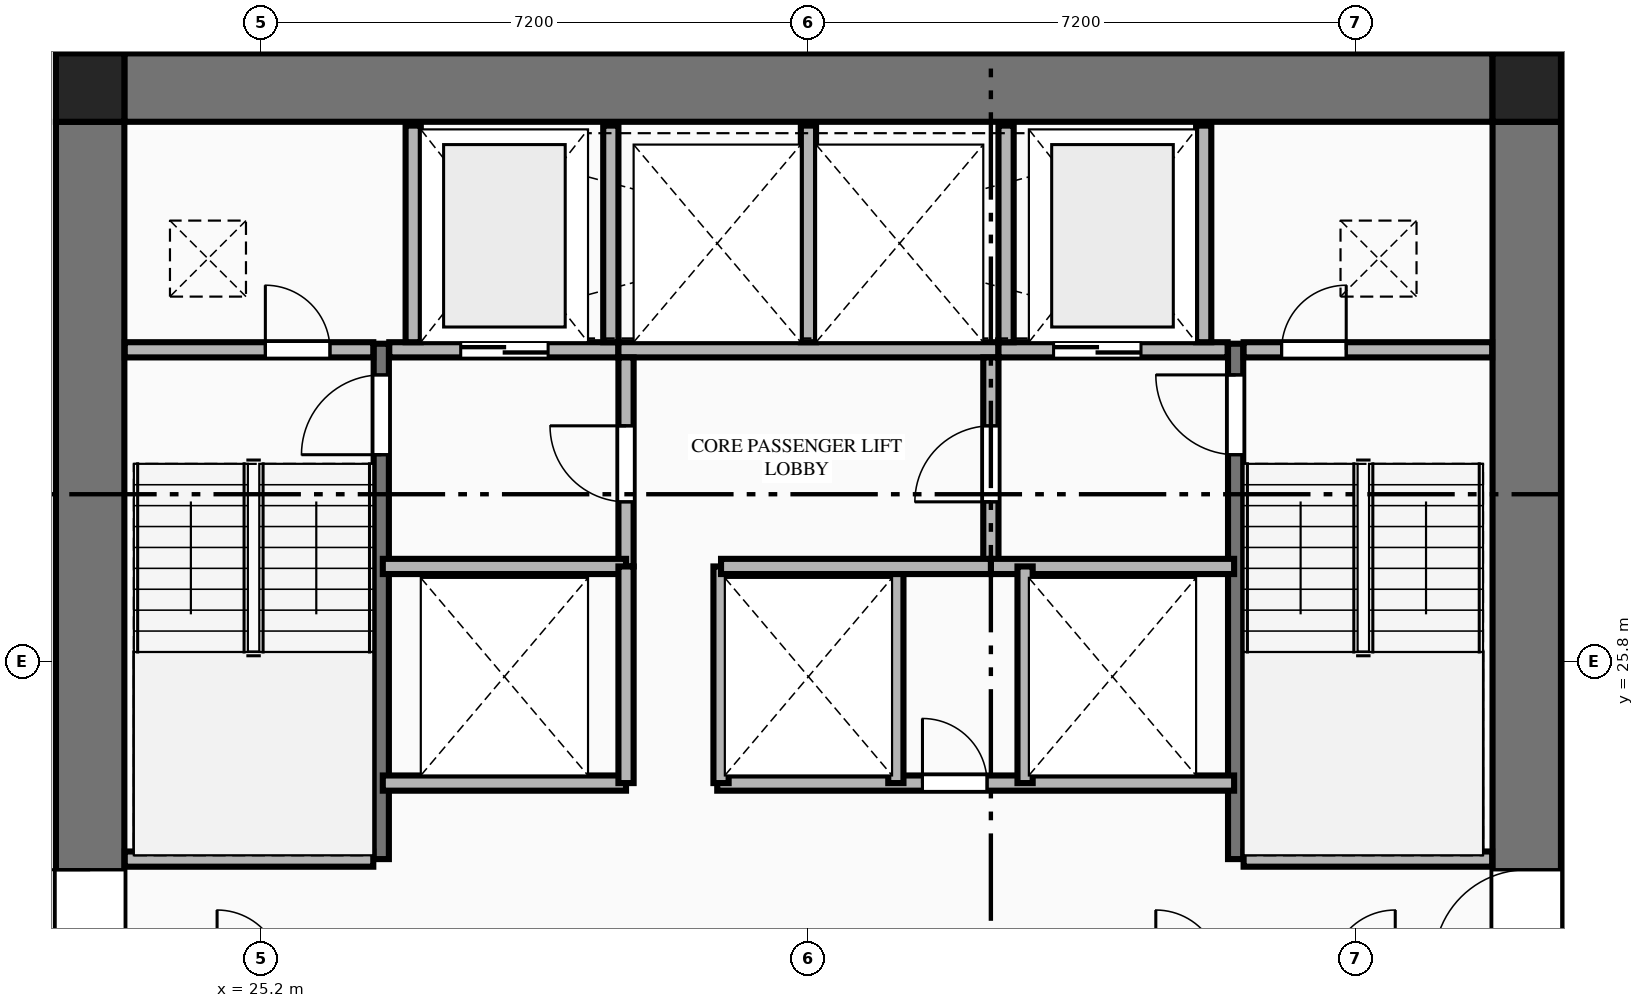
"""IFC4 building model, lengths in metres.
Left out: names, types, materials, properties, quantities, classifications, styles, units other than length and angle.
Written with IfcOpenShell. Run it as: python <this file> out.ifc"""

import sys

from ifc_helpers import new_model, si_unit, direction, frame, frame_2d, origin, origin_2d, place, context, subcontext, project, spatial, rectangle, extrude, element, fill, save


model = new_model("IFC4")
c1 = context("Model", 3, precision=1e-05, world=origin(), true_north=direction((0.0, 1.0)))
c2 = subcontext(c1, "Body", "Model", "MODEL_VIEW")
j1 = project(units=[si_unit("LENGTHUNIT", "METRE"), si_unit("PLANEANGLEUNIT", "RADIAN")], contexts=[c1])
p1 = place(None, origin())
s1 = spatial("IfcSite", under=j1, at=p1, CompositionType="ELEMENT")
p2 = place(p1, origin())
s2 = spatial("IfcBuilding", under=s1, at=p2, CompositionType="ELEMENT")
p3 = place(p2, frame((0.0, 0.0, 71.05)))
s3 = spatial("IfcBuildingStorey", under=s2, at=p3, CompositionType="ELEMENT", Elevation=71.05)
for number, where, z_axis, x_axis in (
    (1, (41.85, 33.35, 0.0), (0.0, 0.0, 1.0), (1.0, 0.0, 0.0)),
    (2, (22.95, 33.35, 0.0), (0.0, 0.0, 1.0), (1.0, 0.0, 0.0)),
):
    element("IfcColumn", number, at=place(p3, frame(where, z_axis=z_axis, x_axis=x_axis)), inside=s3, PredefinedType="COLUMN", context=c2, shape_type="SweptSolid", body=[
        extrude(rectangle(XDim=0.9, YDim=0.9, at=origin_2d()), origin(), (0.0, 0.0, 1.0), 3.55),
    ])
p4 = place(p3, frame((23.4, 33.35, 0.0), z_axis=(0.0, 0.0, 1.0), x_axis=(1.0, 0.0, 0.0)))
e3 = element("IfcWall", 3, at=p4, inside=s3, PredefinedType="SHEAR", context=c2, shape_type="SweptSolid", body=[
    extrude(rectangle(XDim=18.0, YDim=0.9, at=frame_2d((9.0, 0.0))), origin(), (0.0, 0.0, 1.0), 3.27),
])
p5 = place(p3, frame((22.95, 18.9, 0.0), z_axis=(0.0, 0.0, 1.0), x_axis=(0.0, 1.0, 0.0)))
e4 = element("IfcWall", 4, at=p5, inside=s3, PredefinedType="SHEAR", context=c2, shape_type="SweptSolid", body=[
    extrude(rectangle(XDim=14.0, YDim=0.9, at=frame_2d((7.0, 0.0))), origin(), (0.0, 0.0, 1.0), 3.27),
])
p6 = place(p5, frame((2.94, 0.0, 0.0)))
e5 = element("IfcOpeningElement", 5, at=p6, cuts=e4, PredefinedType="OPENING", context=c2, shape_type="SweptSolid", body=[
    extrude(rectangle(XDim=1.22, YDim=2.25, at=frame_2d((0.61, 1.125))), frame((0.0, 0.46, 0.0), z_axis=(0.0, -1.0, 0.0), x_axis=(1.0, 0.0, 0.0)), (0.0, 0.0, 1.0), 0.92),
])
p7 = place(p3, frame((41.85, 18.9, 0.0), z_axis=(0.0, 0.0, 1.0), x_axis=(0.0, 1.0, 0.0)))
e6 = element("IfcWall", 6, at=p7, inside=s3, PredefinedType="SHEAR", context=c2, shape_type="SweptSolid", body=[
    extrude(rectangle(XDim=14.0, YDim=0.9, at=frame_2d((7.0, 0.0))), origin(), (0.0, 0.0, 1.0), 3.27),
])
p8 = place(p7, frame((2.94, 0.0, 0.0)))
e7 = element("IfcOpeningElement", 7, at=p8, cuts=e6, PredefinedType="OPENING", context=c2, shape_type="SweptSolid", body=[
    extrude(rectangle(XDim=1.22, YDim=2.25, at=frame_2d((0.61, 1.125))), frame((0.0, 0.46, 0.0), z_axis=(0.0, -1.0, 0.0), x_axis=(1.0, 0.0, 0.0)), (0.0, 0.0, 1.0), 0.92),
])
p9 = place(p3, frame((26.78, 23.2, 0.0), z_axis=(0.0, 0.0, 1.0), x_axis=(0.0, 1.0, 0.0)))
e8 = element("IfcWall", 8, at=p9, inside=s3, PredefinedType="SHEAR", context=c2, shape_type="SweptSolid", body=[
    extrude(rectangle(XDim=6.78, YDim=0.2, at=frame_2d((3.39, 0.0))), origin(), (0.0, 0.0, 1.0), 3.55),
])
p10 = place(p9, frame((5.32, 0.0, 0.0)))
e9 = element("IfcOpeningElement", 9, at=p10, cuts=e8, PredefinedType="OPENING", context=c2, shape_type="SweptSolid", body=[
    extrude(rectangle(XDim=1.05, YDim=2.15, at=frame_2d((0.525, 1.075))), frame((0.0, 0.11, 0.0), z_axis=(0.0, -1.0, 0.0), x_axis=(1.0, 0.0, 0.0)), (0.0, 0.0, 1.0), 0.22),
])
p11 = place(p3, frame((23.405, 23.2, 0.0), z_axis=(0.0, 0.0, 1.0), x_axis=(1.0, 0.0, 0.0)))
e10 = element("IfcWall", 10, at=p11, inside=s3, PredefinedType="PLUMBINGWALL", context=c2, shape_type="SweptSolid", body=[
    extrude(rectangle(XDim=3.27, YDim=0.2, at=frame_2d((1.635, 0.0))), origin(), (0.0, 0.0, 1.0), 3.27),
])
p12 = place(p3, frame((38.02, 23.2, 0.0), z_axis=(0.0, 0.0, 1.0), x_axis=(0.0, 1.0, 0.0)))
e11 = element("IfcWall", 11, at=p12, inside=s3, PredefinedType="SHEAR", context=c2, shape_type="SweptSolid", body=[
    extrude(rectangle(XDim=6.78, YDim=0.2, at=frame_2d((3.39, 0.0))), origin(), (0.0, 0.0, 1.0), 3.55),
])
p13 = place(p12, frame((5.32, 0.0, 0.0)))
e12 = element("IfcOpeningElement", 12, at=p13, cuts=e11, PredefinedType="OPENING", context=c2, shape_type="SweptSolid", body=[
    extrude(rectangle(XDim=1.05, YDim=2.15, at=frame_2d((0.525, 1.075))), frame((0.0, 0.11, 0.0), z_axis=(0.0, -1.0, 0.0), x_axis=(1.0, 0.0, 0.0)), (0.0, 0.0, 1.0), 0.22),
])
p14 = place(p3, frame((38.125, 23.2, 0.0), z_axis=(0.0, 0.0, 1.0), x_axis=(1.0, 0.0, 0.0)))
e13 = element("IfcWall", 13, at=p14, inside=s3, PredefinedType="PLUMBINGWALL", context=c2, shape_type="SweptSolid", body=[
    extrude(rectangle(XDim=3.27, YDim=0.2, at=frame_2d((1.635, 0.0))), origin(), (0.0, 0.0, 1.0), 3.27),
])
p15 = place(p3, frame((23.405, 29.9, 0.0), z_axis=(0.0, 0.0, 1.0), x_axis=(1.0, 0.0, 0.0)))
e14 = element("IfcWall", 14, at=p15, inside=s3, PredefinedType="PLUMBINGWALL", context=c2, shape_type="SweptSolid", body=[
    extrude(rectangle(XDim=3.27, YDim=0.2, at=frame_2d((1.635, 0.0))), origin(), (0.0, 0.0, 1.0), 3.27),
])
p16 = place(p15, frame((1.85, 0.0, 0.0)))
e15 = element("IfcOpeningElement", 15, at=p16, cuts=e14, PredefinedType="OPENING", context=c2, shape_type="SweptSolid", body=[
    extrude(rectangle(XDim=0.85, YDim=2.05, at=frame_2d((0.425, 1.025))), frame((0.0, 0.11, 0.0), z_axis=(0.0, -1.0, 0.0), x_axis=(1.0, 0.0, 0.0)), (0.0, 0.0, 1.0), 0.22),
])
p17 = place(p3, frame((26.885, 29.9, 0.0), z_axis=(0.0, 0.0, 1.0), x_axis=(1.0, 0.0, 0.0)))
e16 = element("IfcWall", 16, at=p17, inside=s3, PredefinedType="PLUMBINGWALL", context=c2, shape_type="SweptSolid", body=[
    extrude(rectangle(XDim=3.015, YDim=0.2, at=frame_2d((1.507, 0.0))), origin(), (0.0, 0.0, 1.0), 3.27),
])
p18 = place(p17, frame((0.94, 0.0, 0.0)))
e17 = element("IfcOpeningElement", 17, at=p18, cuts=e16, PredefinedType="OPENING", context=c2, shape_type="SweptSolid", body=[
    extrude(rectangle(XDim=1.15, YDim=2.2, at=frame_2d((0.575, 1.1))), frame((0.0, 0.11, 0.0), z_axis=(0.0, -1.0, 0.0), x_axis=(1.0, 0.0, 0.0)), (0.0, 0.0, 1.0), 0.22),
])
p19 = place(p3, frame((29.9, 29.9, 0.0), z_axis=(0.0, 0.0, 1.0), x_axis=(1.0, 0.0, 0.0)))
e18 = element("IfcWall", 18, at=p19, inside=s3, PredefinedType="PLUMBINGWALL", context=c2, shape_type="SweptSolid", body=[
    extrude(rectangle(XDim=5.0, YDim=0.2, at=frame_2d((2.5, 0.0))), origin(), (0.0, 0.0, 1.0), 3.27),
])
p20 = place(p3, frame((34.9, 29.9, 0.0), z_axis=(0.0, 0.0, 1.0), x_axis=(1.0, 0.0, 0.0)))
e19 = element("IfcWall", 19, at=p20, inside=s3, PredefinedType="PLUMBINGWALL", context=c2, shape_type="SweptSolid", body=[
    extrude(rectangle(XDim=3.015, YDim=0.2, at=frame_2d((1.508, 0.0))), origin(), (0.0, 0.0, 1.0), 3.27),
])
p21 = place(p20, frame((0.725, 0.0, 0.0)))
e20 = element("IfcOpeningElement", 20, at=p21, cuts=e19, PredefinedType="OPENING", context=c2, shape_type="SweptSolid", body=[
    extrude(rectangle(XDim=1.15, YDim=2.2, at=frame_2d((0.575, 1.1))), frame((0.0, 0.11, 0.0), z_axis=(0.0, -1.0, 0.0), x_axis=(1.0, 0.0, 0.0)), (0.0, 0.0, 1.0), 0.22),
])
p22 = place(p3, frame((38.125, 29.9, 0.0), z_axis=(0.0, 0.0, 1.0), x_axis=(1.0, 0.0, 0.0)))
e21 = element("IfcWall", 21, at=p22, inside=s3, PredefinedType="PLUMBINGWALL", context=c2, shape_type="SweptSolid", body=[
    extrude(rectangle(XDim=3.27, YDim=0.2, at=frame_2d((1.635, 0.0))), origin(), (0.0, 0.0, 1.0), 3.27),
])
p23 = place(p22, frame((0.5, 0.0, 0.0)))
e22 = element("IfcOpeningElement", 22, at=p23, cuts=e21, PredefinedType="OPENING", context=c2, shape_type="SweptSolid", body=[
    extrude(rectangle(XDim=0.85, YDim=2.05, at=frame_2d((0.425, 1.025))), frame((0.0, 0.11, 0.0), z_axis=(0.0, -1.0, 0.0), x_axis=(1.0, 0.0, 0.0)), (0.0, 0.0, 1.0), 0.22),
])
for number, where, z_axis, x_axis in (
    (23, (27.2, 30.0, 0.0), (0.0, 0.0, 1.0), (0.0, 1.0, 0.0)),
    (24, (29.8, 30.0, 0.0), (0.0, 0.0, 1.0), (0.0, 1.0, 0.0)),
    (25, (32.4, 30.0, 0.0), (0.0, 0.0, 1.0), (0.0, 1.0, 0.0)),
    (26, (35.0, 30.0, 0.0), (0.0, 0.0, 1.0), (0.0, 1.0, 0.0)),
    (27, (37.6, 30.0, 0.0), (0.0, 0.0, 1.0), (0.0, 1.0, 0.0)),
):
    element("IfcWall", number, at=place(p3, frame(where, z_axis=z_axis, x_axis=x_axis)), inside=s3, PredefinedType="PLUMBINGWALL", context=c2, shape_type="SweptSolid", body=[
        extrude(rectangle(XDim=2.85, YDim=0.2, at=frame_2d((1.425, 0.0))), origin(), (0.0, 0.0, 1.0), 3.27),
    ])
p24 = place(p3, frame((30.0, 27.05, 0.0), z_axis=(0.0, 0.0, 1.0), x_axis=(0.0, 1.0, 0.0)))
e28 = element("IfcWall", 28, at=p24, inside=s3, PredefinedType="PLUMBINGWALL", context=c2, shape_type="SweptSolid", body=[
    extrude(rectangle(XDim=2.75, YDim=0.2, at=frame_2d((1.375, 0.0))), origin(), (0.0, 0.0, 1.0), 3.27),
])
p25 = place(p24, frame((0.85, 0.0, 0.0)))
e29 = element("IfcOpeningElement", 29, at=p25, cuts=e28, PredefinedType="OPENING", context=c2, shape_type="SweptSolid", body=[
    extrude(rectangle(XDim=1.0, YDim=2.15, at=frame_2d((0.5, 1.075))), frame((0.0, 0.11, 0.0), z_axis=(0.0, -1.0, 0.0), x_axis=(1.0, 0.0, 0.0)), (0.0, 0.0, 1.0), 0.22),
])
p26 = place(p3, frame((26.8, 27.05, 0.0), z_axis=(0.0, 0.0, 1.0), x_axis=(1.0, 0.0, 0.0)))
e30 = element("IfcWall", 30, at=p26, inside=s3, PredefinedType="PLUMBINGWALL", context=c2, shape_type="SweptSolid", body=[
    extrude(rectangle(XDim=3.2, YDim=0.2, at=frame_2d((1.6, 0.0))), origin(), (0.0, 0.0, 1.0), 3.27),
])
p27 = place(p3, frame((34.8, 27.05, 0.0), z_axis=(0.0, 0.0, 1.0), x_axis=(0.0, 1.0, 0.0)))
e31 = element("IfcWall", 31, at=p27, inside=s3, PredefinedType="PLUMBINGWALL", context=c2, shape_type="SweptSolid", body=[
    extrude(rectangle(XDim=2.75, YDim=0.2, at=frame_2d((1.375, 0.0))), origin(), (0.0, 0.0, 1.0), 3.27),
])
p28 = place(p27, frame((0.85, 0.0, 0.0)))
e32 = element("IfcOpeningElement", 32, at=p28, cuts=e31, PredefinedType="OPENING", context=c2, shape_type="SweptSolid", body=[
    extrude(rectangle(XDim=1.0, YDim=2.15, at=frame_2d((0.5, 1.075))), frame((0.0, 0.11, 0.0), z_axis=(0.0, -1.0, 0.0), x_axis=(1.0, 0.0, 0.0)), (0.0, 0.0, 1.0), 0.22),
])
for number, where, z_axis, x_axis in (
    (33, (34.8, 27.05, 0.0), (0.0, 0.0, 1.0), (1.0, 0.0, 0.0)),
    (34, (26.8, 24.2, 0.0), (0.0, 0.0, 1.0), (1.0, 0.0, 0.0)),
):
    element("IfcWall", number, at=place(p3, frame(where, z_axis=z_axis, x_axis=x_axis)), inside=s3, PredefinedType="PLUMBINGWALL", context=c2, shape_type="SweptSolid", body=[
        extrude(rectangle(XDim=3.2, YDim=0.2, at=frame_2d((1.6, 0.0))), origin(), (0.0, 0.0, 1.0), 3.27),
    ])
p29 = place(p3, frame((30.0, 24.2, 0.0), z_axis=(0.0, 0.0, 1.0), x_axis=(0.0, 1.0, 0.0)))
e35 = element("IfcWall", 35, at=p29, inside=s3, PredefinedType="PLUMBINGWALL", context=c2, shape_type="SweptSolid", body=[
    extrude(rectangle(XDim=2.85, YDim=0.2, at=frame_2d((1.425, 0.0))), origin(), (0.0, 0.0, 1.0), 3.27),
])
p30 = place(p3, frame((31.2, 24.2, 0.0), z_axis=(0.0, 0.0, 1.0), x_axis=(1.0, 0.0, 0.0)))
e36 = element("IfcWall", 36, at=p30, inside=s3, PredefinedType="PLUMBINGWALL", context=c2, shape_type="SweptSolid", body=[
    extrude(rectangle(XDim=6.8, YDim=0.2, at=frame_2d((3.4, 0.0))), origin(), (0.0, 0.0, 1.0), 3.27),
])
p31 = place(p30, frame((2.7, 0.0, 0.0)))
e37 = element("IfcOpeningElement", 37, at=p31, cuts=e36, PredefinedType="OPENING", context=c2, shape_type="SweptSolid", body=[
    extrude(rectangle(XDim=0.85, YDim=2.05, at=frame_2d((0.425, 1.025))), frame((0.0, 0.11, 0.0), z_axis=(0.0, -1.0, 0.0), x_axis=(1.0, 0.0, 0.0)), (0.0, 0.0, 1.0), 0.22),
])
for number, where, z_axis, x_axis in (
    (38, (31.25, 24.2, 0.0), (0.0, 0.0, 1.0), (0.0, 1.0, 0.0)),
    (39, (33.55, 24.2, 0.0), (0.0, 0.0, 1.0), (0.0, 1.0, 0.0)),
    (40, (35.25, 24.2, 0.0), (0.0, 0.0, 1.0), (0.0, 1.0, 0.0)),
):
    element("IfcWall", number, at=place(p3, frame(where, z_axis=z_axis, x_axis=x_axis)), inside=s3, PredefinedType="PLUMBINGWALL", context=c2, shape_type="SweptSolid", body=[
        extrude(rectangle(XDim=2.85, YDim=0.2, at=frame_2d((1.425, 0.0))), origin(), (0.0, 0.0, 1.0), 3.27),
    ])
p32 = place(p3, frame((31.25, 27.05, 0.0), z_axis=(0.0, 0.0, 1.0), x_axis=(1.0, 0.0, 0.0)))
e41 = element("IfcWall", 41, at=p32, inside=s3, PredefinedType="PLUMBINGWALL", context=c2, shape_type="SweptSolid", body=[
    extrude(rectangle(XDim=3.55, YDim=0.2, at=frame_2d((1.775, 0.0))), origin(), (0.0, 0.0, 1.0), 3.27),
])
p33 = place(p6, origin())
e42 = element("IfcDoor", 42, at=p33, inside=s3, OperationType="SINGLE_SWING_RIGHT", PredefinedType="DOOR", context=c2, shape_type="SweptSolid", body=[
    extrude(rectangle(XDim=1.22, YDim=2.25, at=frame_2d((0.61, 1.125))), frame((0.0, 0.025, 0.0), z_axis=(0.0, -1.0, 0.0), x_axis=(1.0, 0.0, 0.0)), (0.0, 0.0, 1.0), 0.05),
])
fill(e5, e42)
p34 = place(p8, origin())
e43 = element("IfcDoor", 43, at=p34, inside=s3, OperationType="SINGLE_SWING_LEFT", PredefinedType="DOOR", context=c2, shape_type="SweptSolid", body=[
    extrude(rectangle(XDim=1.22, YDim=2.25, at=frame_2d((0.61, 1.125))), frame((0.0, 0.025, 0.0), z_axis=(0.0, -1.0, 0.0), x_axis=(1.0, 0.0, 0.0)), (0.0, 0.0, 1.0), 0.05),
])
fill(e7, e43)
p35 = place(p10, origin())
e44 = element("IfcDoor", 44, at=p35, inside=s3, OperationType="SINGLE_SWING_LEFT", PredefinedType="DOOR", context=c2, shape_type="SweptSolid", body=[
    extrude(rectangle(XDim=1.05, YDim=2.15, at=frame_2d((0.525, 1.075))), frame((0.0, 0.025, 0.0), z_axis=(0.0, -1.0, 0.0), x_axis=(1.0, 0.0, 0.0)), (0.0, 0.0, 1.0), 0.05),
])
fill(e9, e44)
p36 = place(p13, origin())
e45 = element("IfcDoor", 45, at=p36, inside=s3, OperationType="SINGLE_SWING_RIGHT", PredefinedType="DOOR", context=c2, shape_type="SweptSolid", body=[
    extrude(rectangle(XDim=1.05, YDim=2.15, at=frame_2d((0.525, 1.075))), frame((0.0, 0.025, 0.0), z_axis=(0.0, -1.0, 0.0), x_axis=(1.0, 0.0, 0.0)), (0.0, 0.0, 1.0), 0.05),
])
fill(e12, e45)
p37 = place(p16, origin())
e46 = element("IfcDoor", 46, at=p37, inside=s3, OperationType="SINGLE_SWING_LEFT", PredefinedType="DOOR", context=c2, shape_type="SweptSolid", body=[
    extrude(rectangle(XDim=0.85, YDim=2.05, at=frame_2d((0.425, 1.025))), frame((0.0, 0.025, 0.0), z_axis=(0.0, -1.0, 0.0), x_axis=(1.0, 0.0, 0.0)), (0.0, 0.0, 1.0), 0.05),
])
fill(e15, e46)
p38 = place(p23, origin())
e47 = element("IfcDoor", 47, at=p38, inside=s3, OperationType="SINGLE_SWING_RIGHT", PredefinedType="DOOR", context=c2, shape_type="SweptSolid", body=[
    extrude(rectangle(XDim=0.85, YDim=2.05, at=frame_2d((0.425, 1.025))), frame((0.0, 0.025, 0.0), z_axis=(0.0, -1.0, 0.0), x_axis=(1.0, 0.0, 0.0)), (0.0, 0.0, 1.0), 0.05),
])
fill(e22, e47)
p39 = place(p18, origin())
e48 = element("IfcDoor", 48, at=p39, inside=s3, OperationType="DOUBLE_DOOR_SLIDING", PredefinedType="DOOR", context=c2, shape_type="SweptSolid", body=[
    extrude(rectangle(XDim=1.15, YDim=2.2, at=frame_2d((0.575, 1.1))), frame((0.0, 0.025, 0.0), z_axis=(0.0, -1.0, 0.0), x_axis=(1.0, 0.0, 0.0)), (0.0, 0.0, 1.0), 0.05),
])
fill(e17, e48)
p40 = place(p21, origin())
e49 = element("IfcDoor", 49, at=p40, inside=s3, OperationType="DOUBLE_DOOR_SLIDING", PredefinedType="DOOR", context=c2, shape_type="SweptSolid", body=[
    extrude(rectangle(XDim=1.15, YDim=2.2, at=frame_2d((0.575, 1.1))), frame((0.0, 0.025, 0.0), z_axis=(0.0, -1.0, 0.0), x_axis=(1.0, 0.0, 0.0)), (0.0, 0.0, 1.0), 0.05),
])
fill(e20, e49)
p41 = place(p25, origin())
e50 = element("IfcDoor", 50, at=p41, inside=s3, OperationType="SINGLE_SWING_RIGHT", PredefinedType="DOOR", context=c2, shape_type="SweptSolid", body=[
    extrude(rectangle(XDim=1.0, YDim=2.15, at=frame_2d((0.5, 1.075))), frame((0.0, 0.025, 0.0), z_axis=(0.0, -1.0, 0.0), x_axis=(1.0, 0.0, 0.0)), (0.0, 0.0, 1.0), 0.05),
])
fill(e29, e50)
p42 = place(p28, origin())
e51 = element("IfcDoor", 51, at=p42, inside=s3, OperationType="SINGLE_SWING_LEFT", PredefinedType="DOOR", context=c2, shape_type="SweptSolid", body=[
    extrude(rectangle(XDim=1.0, YDim=2.15, at=frame_2d((0.5, 1.075))), frame((0.0, 0.025, 0.0), z_axis=(0.0, -1.0, 0.0), x_axis=(1.0, 0.0, 0.0)), (0.0, 0.0, 1.0), 0.05),
])
fill(e32, e51)
p43 = place(p31, origin())
e52 = element("IfcDoor", 52, at=p43, inside=s3, OperationType="SINGLE_SWING_LEFT", PredefinedType="DOOR", context=c2, shape_type="SweptSolid", body=[
    extrude(rectangle(XDim=0.85, YDim=2.05, at=frame_2d((0.425, 1.025))), frame((0.0, 0.025, 0.0), z_axis=(0.0, -1.0, 0.0), x_axis=(1.0, 0.0, 0.0)), (0.0, 0.0, 1.0), 0.05),
])
fill(e37, e52)
save(model, sys.argv[1])
